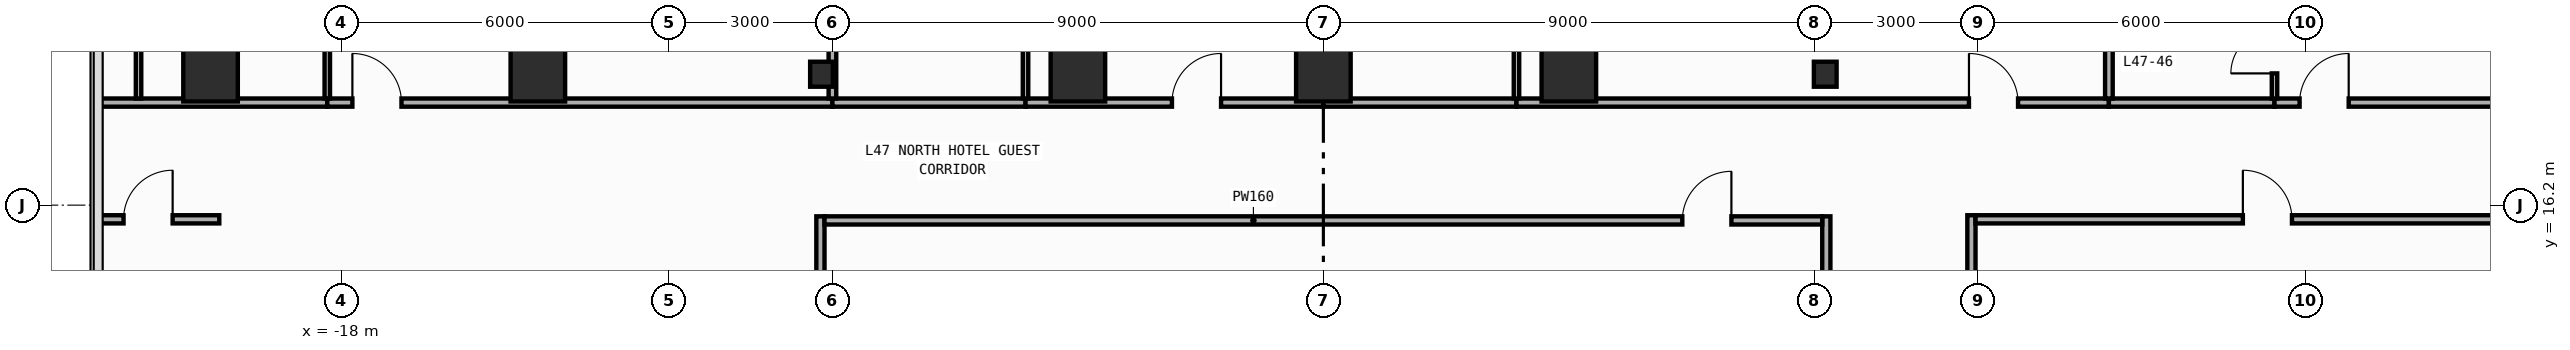
"""IFC4 building model, lengths in metres.
Left out: names, types, materials, properties, quantities, classifications, styles, units other than length and angle.
Written with IfcOpenShell. Run it as: python <this file> out.ifc"""

import sys

from ifc_helpers import new_model, si_unit, direction, frame, frame_2d, origin, origin_2d, place, context, subcontext, project, spatial, rectangle, i_section, extrude, element, fill, save


model = new_model("IFC4")
c1 = context("Model", 3, precision=1e-05, world=origin(), true_north=direction((0.0, 1.0)))
c2 = subcontext(c1, "Body", "Model", "MODEL_VIEW")
j1 = project(units=[si_unit("LENGTHUNIT", "METRE"), si_unit("PLANEANGLEUNIT", "RADIAN")], contexts=[c1])
p1 = place(None, origin())
s1 = spatial("IfcSite", under=j1, at=p1, CompositionType="ELEMENT")
p2 = place(p1, origin())
s2 = spatial("IfcBuilding", under=s1, at=p2, CompositionType="ELEMENT")
p3 = place(p2, frame((0.0, 0.0, 203.0)))
s3 = spatial("IfcBuildingStorey", under=s2, at=p3, CompositionType="ELEMENT", Elevation=203.0)
for number, where, z_axis, x_axis in (
    (1, (-9.2, 18.6, 0.0), (0.0, 0.0, 1.0), (1.0, 0.0, 0.0)),
    (2, (9.2, 18.6, 0.0), (0.0, 0.0, 1.0), (1.0, 0.0, 0.0)),
):
    element("IfcColumn", number, at=place(p3, frame(where, z_axis=z_axis, x_axis=x_axis)), inside=s3, PredefinedType="COLUMN", context=c2, shape_type="SweptSolid", body=[
        extrude(i_section(OverallWidth=0.417, OverallDepth=0.458, WebThickness=0.03, FlangeThickness=0.05, FilletRadius=0.022, at=origin_2d()), origin(), (0.0, 0.0, 1.0), 3.8),
    ])
for number, where, z_axis, x_axis in (
    (3, (-20.4, 18.6, 0.0), (0.0, 0.0, 1.0), (1.0, 0.0, 0.0)),
    (4, (-14.4, 18.6, 0.0), (0.0, 0.0, 1.0), (1.0, 0.0, 0.0)),
    (5, (-4.5, 18.6, 0.0), (0.0, 0.0, 1.0), (1.0, 0.0, 0.0)),
    (6, (0.0, 18.6, 0.0), (0.0, 0.0, 1.0), (1.0, 0.0, 0.0)),
    (7, (4.5, 18.6, 0.0), (0.0, 0.0, 1.0), (1.0, 0.0, 0.0)),
):
    element("IfcColumn", number, at=place(p3, frame(where, z_axis=z_axis, x_axis=x_axis)), inside=s3, PredefinedType="COLUMN", context=c2, shape_type="SweptSolid", body=[
        extrude(rectangle(XDim=1.0, YDim=1.0, at=origin_2d()), origin(), (0.0, 0.0, 1.0), 3.8),
    ])
p4 = place(p3, frame((-9.22, -1.8, 0.0), z_axis=(0.0, 0.0, 1.0), x_axis=(0.0, 1.0, 0.0)))
e8 = element("IfcWall", 8, at=p4, inside=s3, PredefinedType="PARTITIONING", context=c2, shape_type="SweptSolid", body=[
    extrude(rectangle(XDim=17.795, YDim=0.15, at=frame_2d((8.897, 0.0))), origin(), (0.0, 0.0, 1.0), 2.952),
])
p5 = place(p4, frame((6.729, 0.0, 0.0)))
e9 = element("IfcOpeningElement", 9, at=p5, cuts=e8, PredefinedType="OPENING", context=c2, shape_type="SweptSolid", body=[
    extrude(rectangle(XDim=0.9, YDim=2.15, at=frame_2d((0.45, 1.075))), frame((0.0, 0.085, 0.0), z_axis=(0.0, -1.0, 0.0), x_axis=(1.0, 0.0, 0.0)), (0.0, 0.0, 1.0), 0.17),
])
p6 = place(p3, frame((9.22, -1.8, 0.0), z_axis=(0.0, 0.0, 1.0), x_axis=(0.0, 1.0, 0.0)))
e10 = element("IfcWall", 10, at=p6, inside=s3, PredefinedType="PARTITIONING", context=c2, shape_type="SweptSolid", body=[
    extrude(rectangle(XDim=17.795, YDim=0.15, at=frame_2d((8.897, 0.0))), origin(), (0.0, 0.0, 1.0), 2.952),
])
p7 = place(p6, frame((6.729, 0.0, 0.0)))
e11 = element("IfcOpeningElement", 11, at=p7, cuts=e10, PredefinedType="OPENING", context=c2, shape_type="SweptSolid", body=[
    extrude(rectangle(XDim=0.9, YDim=2.15, at=frame_2d((0.45, 1.075))), frame((0.0, 0.085, 0.0), z_axis=(0.0, -1.0, 0.0), x_axis=(1.0, 0.0, 0.0)), (0.0, 0.0, 1.0), 0.17),
])
p8 = place(p3, frame((11.88, 7.16, 0.0), z_axis=(0.0, 0.0, 1.0), x_axis=(0.0, 1.0, 0.0)))
e12 = element("IfcWall", 12, at=p8, inside=s3, PredefinedType="PARTITIONING", context=c2, shape_type="SweptSolid", body=[
    extrude(rectangle(XDim=8.855, YDim=0.15, at=frame_2d((4.427, 0.0))), origin(), (0.0, 0.0, 1.0), 3.54),
])
p9 = place(p8, frame((0.46, 0.0, 0.0)))
e13 = element("IfcOpeningElement", 13, at=p9, cuts=e12, PredefinedType="OPENING", context=c2, shape_type="SweptSolid", body=[
    extrude(rectangle(XDim=0.9, YDim=2.15, at=frame_2d((0.45, 1.075))), frame((0.0, 0.085, 0.0), z_axis=(0.0, -1.0, 0.0), x_axis=(1.0, 0.0, 0.0)), (0.0, 0.0, 1.0), 0.17),
])
p10 = place(p3, frame((-9.145, 15.92, 0.0), z_axis=(0.0, 0.0, 1.0), x_axis=(1.0, 0.0, 0.0)))
e14 = element("IfcWall", 14, at=p10, inside=s3, PredefinedType="PARTITIONING", context=c2, shape_type="SweptSolid", body=[
    extrude(rectangle(XDim=18.29, YDim=0.15, at=frame_2d((9.145, 0.0))), origin(), (0.0, 0.0, 1.0), 3.54),
])
p11 = place(p10, frame((15.725, 0.0, 0.0)))
e15 = element("IfcOpeningElement", 15, at=p11, cuts=e14, PredefinedType="OPENING", context=c2, shape_type="SweptSolid", body=[
    extrude(rectangle(XDim=0.9, YDim=2.15, at=frame_2d((0.45, 1.075))), frame((0.0, 0.085, 0.0), z_axis=(0.0, -1.0, 0.0), x_axis=(1.0, 0.0, 0.0)), (0.0, 0.0, 1.0), 0.17),
])
p12 = place(p3, frame((-22.455, 18.08, 0.0), z_axis=(0.0, 0.0, 1.0), x_axis=(1.0, 0.0, 0.0)))
e16 = element("IfcWall", 16, at=p12, inside=s3, PredefinedType="PARTITIONING", context=c2, shape_type="SweptSolid", body=[
    extrude(rectangle(XDim=4.195, YDim=0.15, at=frame_2d((2.098, 0.0))), origin(), (0.0, 0.0, 1.0), 3.54),
])
p13 = place(p3, frame((-18.26, 18.08, 0.0), z_axis=(0.0, 0.0, 1.0), x_axis=(1.0, 0.0, 0.0)))
e17 = element("IfcWall", 17, at=p13, inside=s3, PredefinedType="PARTITIONING", context=c2, shape_type="SweptSolid", body=[
    extrude(rectangle(XDim=9.26, YDim=0.15, at=frame_2d((4.63, 0.0))), origin(), (0.0, 0.0, 1.0), 3.54),
])
p14 = place(p13, frame((0.46, 0.0, 0.0)))
e18 = element("IfcOpeningElement", 18, at=p14, cuts=e17, PredefinedType="OPENING", context=c2, shape_type="SweptSolid", body=[
    extrude(rectangle(XDim=0.9, YDim=2.15, at=frame_2d((0.45, 1.075))), frame((0.0, 0.085, 0.0), z_axis=(0.0, -1.0, 0.0), x_axis=(1.0, 0.0, 0.0)), (0.0, 0.0, 1.0), 0.17),
])
p15 = place(p3, frame((-9.0, 18.08, 0.0), z_axis=(0.0, 0.0, 1.0), x_axis=(1.0, 0.0, 0.0)))
e19 = element("IfcWall", 19, at=p15, inside=s3, PredefinedType="PARTITIONING", context=c2, shape_type="SweptSolid", body=[
    extrude(rectangle(XDim=3.54, YDim=0.15, at=frame_2d((1.77, 0.0))), origin(), (0.0, 0.0, 1.0), 3.54),
])
p16 = place(p3, frame((-5.46, 18.08, 0.0), z_axis=(0.0, 0.0, 1.0), x_axis=(1.0, 0.0, 0.0)))
e20 = element("IfcWall", 20, at=p16, inside=s3, PredefinedType="PARTITIONING", context=c2, shape_type="SweptSolid", body=[
    extrude(rectangle(XDim=5.46, YDim=0.15, at=frame_2d((2.73, 0.0))), origin(), (0.0, 0.0, 1.0), 3.54),
])
p17 = place(p16, frame((2.684, 0.0, 0.0)))
e21 = element("IfcOpeningElement", 21, at=p17, cuts=e20, PredefinedType="OPENING", context=c2, shape_type="SweptSolid", body=[
    extrude(rectangle(XDim=0.9, YDim=2.15, at=frame_2d((0.45, 1.075))), frame((0.0, 0.085, 0.0), z_axis=(0.0, -1.0, 0.0), x_axis=(1.0, 0.0, 0.0)), (0.0, 0.0, 1.0), 0.17),
])
p18 = place(p3, frame((0.0, 18.08, 0.0), z_axis=(0.0, 0.0, 1.0), x_axis=(1.0, 0.0, 0.0)))
e22 = element("IfcWall", 22, at=p18, inside=s3, PredefinedType="PARTITIONING", context=c2, shape_type="SweptSolid", body=[
    extrude(rectangle(XDim=3.54, YDim=0.15, at=frame_2d((1.77, 0.0))), origin(), (0.0, 0.0, 1.0), 3.54),
])
p19 = place(p3, frame((3.54, 18.08, 0.0), z_axis=(0.0, 0.0, 1.0), x_axis=(1.0, 0.0, 0.0)))
e23 = element("IfcWall", 23, at=p19, inside=s3, PredefinedType="PARTITIONING", context=c2, shape_type="SweptSolid", body=[
    extrude(rectangle(XDim=10.86, YDim=0.15, at=frame_2d((5.43, 0.0))), origin(), (0.0, 0.0, 1.0), 3.54),
])
p20 = place(p19, frame((8.295, 0.0, 0.0)))
e24 = element("IfcOpeningElement", 24, at=p20, cuts=e23, PredefinedType="OPENING", context=c2, shape_type="SweptSolid", body=[
    extrude(rectangle(XDim=0.9, YDim=2.15, at=frame_2d((0.45, 1.075))), frame((0.0, 0.085, 0.0), z_axis=(0.0, -1.0, 0.0), x_axis=(1.0, 0.0, 0.0)), (0.0, 0.0, 1.0), 0.17),
])
p21 = place(p3, frame((14.4, 18.08, 0.0), z_axis=(0.0, 0.0, 1.0), x_axis=(1.0, 0.0, 0.0)))
e25 = element("IfcWall", 25, at=p21, inside=s3, PredefinedType="PARTITIONING", context=c2, shape_type="SweptSolid", body=[
    extrude(rectangle(XDim=3.036, YDim=0.15, at=frame_2d((1.518, 0.0))), origin(), (0.0, 0.0, 1.0), 3.54),
])
p22 = place(p3, frame((17.436, 18.08, 0.0), z_axis=(0.0, 0.0, 1.0), x_axis=(1.0, 0.0, 0.0)))
e26 = element("IfcWall", 26, at=p22, inside=s3, PredefinedType="PARTITIONING", context=c2, shape_type="SweptSolid", body=[
    extrude(rectangle(XDim=5.019, YDim=0.15, at=frame_2d((2.51, 0.0))), origin(), (0.0, 0.0, 1.0), 3.54),
])
p23 = place(p22, frame((0.46, 0.0, 0.0)))
e27 = element("IfcOpeningElement", 27, at=p23, cuts=e26, PredefinedType="OPENING", context=c2, shape_type="SweptSolid", body=[
    extrude(rectangle(XDim=0.9, YDim=2.15, at=frame_2d((0.45, 1.075))), frame((0.0, 0.085, 0.0), z_axis=(0.0, -1.0, 0.0), x_axis=(1.0, 0.0, 0.0)), (0.0, 0.0, 1.0), 0.17),
])
p24 = place(p3, frame((11.955, 15.94, 0.0), z_axis=(0.0, 0.0, 1.0), x_axis=(1.0, 0.0, 0.0)))
e28 = element("IfcWall", 28, at=p24, inside=s3, PredefinedType="PARTITIONING", context=c2, shape_type="SweptSolid", body=[
    extrude(rectangle(XDim=10.5, YDim=0.15, at=frame_2d((5.25, 0.0))), origin(), (0.0, 0.0, 1.0), 3.54),
])
p25 = place(p24, frame((4.901, 0.0, 0.0)))
e29 = element("IfcOpeningElement", 29, at=p25, cuts=e28, PredefinedType="OPENING", context=c2, shape_type="SweptSolid", body=[
    extrude(rectangle(XDim=0.9, YDim=2.15, at=frame_2d((0.45, 1.075))), frame((0.0, 0.085, 0.0), z_axis=(0.0, -1.0, 0.0), x_axis=(1.0, 0.0, 0.0)), (0.0, 0.0, 1.0), 0.17),
])
p26 = place(p3, frame((-22.455, 15.94, 0.0), z_axis=(0.0, 0.0, 1.0), x_axis=(1.0, 0.0, 0.0)))
e30 = element("IfcWall", 30, at=p26, inside=s3, PredefinedType="PARTITIONING", context=c2, shape_type="SweptSolid", body=[
    extrude(rectangle(XDim=2.215, YDim=0.15, at=frame_2d((1.107, 0.0))), origin(), (0.0, 0.0, 1.0), 3.54),
])
p27 = place(p26, frame((0.46, 0.0, 0.0)))
e31 = element("IfcOpeningElement", 31, at=p27, cuts=e30, PredefinedType="OPENING", context=c2, shape_type="SweptSolid", body=[
    extrude(rectangle(XDim=0.9, YDim=2.15, at=frame_2d((0.45, 1.075))), frame((0.0, 0.085, 0.0), z_axis=(0.0, -1.0, 0.0), x_axis=(1.0, 0.0, 0.0)), (0.0, 0.0, 1.0), 0.17),
])
p28 = place(p3, frame((-18.26, 18.155, 0.0), z_axis=(0.0, 0.0, 1.0), x_axis=(0.0, 1.0, 0.0)))
e32 = element("IfcWall", 32, at=p28, inside=s3, PredefinedType="PARTITIONING", context=c2, shape_type="SweptSolid", body=[
    extrude(rectangle(XDim=2.965, YDim=0.1, at=frame_2d((1.482, 0.0))), origin(), (0.0, 0.0, 1.0), 3.54),
])
p29 = place(p28, frame((1.705, 0.0, 0.0)))
e33 = element("IfcOpeningElement", 33, at=p29, cuts=e32, PredefinedType="OPENING", context=c2, shape_type="SweptSolid", body=[
    extrude(rectangle(XDim=0.8, YDim=2.1, at=frame_2d((0.4, 1.05))), frame((0.0, 0.06, 0.0), z_axis=(0.0, -1.0, 0.0), x_axis=(1.0, 0.0, 0.0)), (0.0, 0.0, 1.0), 0.12),
])
p30 = place(p3, frame((-9.0, 18.155, 0.0), z_axis=(0.0, 0.0, 1.0), x_axis=(0.0, 1.0, 0.0)))
e34 = element("IfcWall", 34, at=p30, inside=s3, PredefinedType="PARTITIONING", context=c2, shape_type="SweptSolid", body=[
    extrude(rectangle(XDim=3.015, YDim=0.14, at=frame_2d((1.507, 0.0))), origin(), (0.0, 0.0, 1.0), 2.952),
])
p31 = place(p3, frame((-5.46, 18.155, 0.0), z_axis=(0.0, 0.0, 1.0), x_axis=(0.0, 1.0, 0.0)))
e35 = element("IfcWall", 35, at=p31, inside=s3, PredefinedType="PARTITIONING", context=c2, shape_type="SweptSolid", body=[
    extrude(rectangle(XDim=2.965, YDim=0.1, at=frame_2d((1.482, 0.0))), origin(), (0.0, 0.0, 1.0), 3.54),
])
p32 = place(p31, frame((1.705, 0.0, 0.0)))
e36 = element("IfcOpeningElement", 36, at=p32, cuts=e35, PredefinedType="OPENING", context=c2, shape_type="SweptSolid", body=[
    extrude(rectangle(XDim=0.8, YDim=2.1, at=frame_2d((0.4, 1.05))), frame((0.0, 0.06, 0.0), z_axis=(0.0, -1.0, 0.0), x_axis=(1.0, 0.0, 0.0)), (0.0, 0.0, 1.0), 0.12),
])
p33 = place(p3, frame((0.0, 18.155, 0.0), z_axis=(0.0, 0.0, 1.0), x_axis=(0.0, 1.0, 0.0)))
e37 = element("IfcWall", 37, at=p33, inside=s3, PredefinedType="PARTITIONING", context=c2, shape_type="SweptSolid", body=[
    extrude(rectangle(XDim=3.015, YDim=0.14, at=frame_2d((1.507, 0.0))), origin(), (0.0, 0.0, 1.0), 3.54),
])
p34 = place(p3, frame((3.54, 18.155, 0.0), z_axis=(0.0, 0.0, 1.0), x_axis=(0.0, 1.0, 0.0)))
e38 = element("IfcWall", 38, at=p34, inside=s3, PredefinedType="PARTITIONING", context=c2, shape_type="SweptSolid", body=[
    extrude(rectangle(XDim=2.965, YDim=0.1, at=frame_2d((1.482, 0.0))), origin(), (0.0, 0.0, 1.0), 3.54),
])
p35 = place(p34, frame((1.705, 0.0, 0.0)))
e39 = element("IfcOpeningElement", 39, at=p35, cuts=e38, PredefinedType="OPENING", context=c2, shape_type="SweptSolid", body=[
    extrude(rectangle(XDim=0.8, YDim=2.1, at=frame_2d((0.4, 1.05))), frame((0.0, 0.06, 0.0), z_axis=(0.0, -1.0, 0.0), x_axis=(1.0, 0.0, 0.0)), (0.0, 0.0, 1.0), 0.12),
])
p36 = place(p3, frame((14.4, 18.155, 0.0), z_axis=(0.0, 0.0, 1.0), x_axis=(0.0, 1.0, 0.0)))
e40 = element("IfcWall", 40, at=p36, inside=s3, PredefinedType="PARTITIONING", context=c2, shape_type="SweptSolid", body=[
    extrude(rectangle(XDim=3.015, YDim=0.14, at=frame_2d((1.507, 0.0))), origin(), (0.0, 0.0, 1.0), 2.952),
])
p37 = place(p3, frame((17.436, 18.155, 0.0), z_axis=(0.0, 0.0, 1.0), x_axis=(0.0, 1.0, 0.0)))
e41 = element("IfcWall", 41, at=p37, inside=s3, PredefinedType="PARTITIONING", context=c2, shape_type="SweptSolid", body=[
    extrude(rectangle(XDim=2.965, YDim=0.1, at=frame_2d((1.482, 0.0))), origin(), (0.0, 0.0, 1.0), 3.54),
])
p38 = place(p37, frame((0.46, 0.0, 0.0)))
e42 = element("IfcOpeningElement", 42, at=p38, cuts=e41, PredefinedType="OPENING", context=c2, shape_type="SweptSolid", body=[
    extrude(rectangle(XDim=0.8, YDim=2.1, at=frame_2d((0.4, 1.05))), frame((0.0, 0.06, 0.0), z_axis=(0.0, -1.0, 0.0), x_axis=(1.0, 0.0, 0.0)), (0.0, 0.0, 1.0), 0.12),
])
p39 = place(p3, frame((-21.72, 18.155, 0.0), z_axis=(0.0, 0.0, 1.0), x_axis=(0.0, 1.0, 0.0)))
e43 = element("IfcWall", 43, at=p39, inside=s3, PredefinedType="PARTITIONING", context=c2, shape_type="SweptSolid", body=[
    extrude(rectangle(XDim=2.965, YDim=0.1, at=frame_2d((1.482, 0.0))), origin(), (0.0, 0.0, 1.0), 3.54),
])
p40 = place(p11, origin())
e44 = element("IfcDoor", 44, at=p40, inside=s3, OperationType="SINGLE_SWING_RIGHT", PredefinedType="DOOR", context=c2, shape_type="SweptSolid", body=[
    extrude(rectangle(XDim=0.9, YDim=2.15, at=frame_2d((0.45, 1.075))), frame((0.0, 0.025, 0.0), z_axis=(0.0, -1.0, 0.0), x_axis=(1.0, 0.0, 0.0)), (0.0, 0.0, 1.0), 0.05),
])
fill(e15, e44)
p41 = place(p14, origin())
e45 = element("IfcDoor", 45, at=p41, inside=s3, OperationType="SINGLE_SWING_LEFT", PredefinedType="DOOR", context=c2, shape_type="SweptSolid", body=[
    extrude(rectangle(XDim=0.9, YDim=2.15, at=frame_2d((0.45, 1.075))), frame((0.0, 0.025, 0.0), z_axis=(0.0, -1.0, 0.0), x_axis=(1.0, 0.0, 0.0)), (0.0, 0.0, 1.0), 0.05),
])
fill(e18, e45)
p42 = place(p17, origin())
e46 = element("IfcDoor", 46, at=p42, inside=s3, OperationType="SINGLE_SWING_RIGHT", PredefinedType="DOOR", context=c2, shape_type="SweptSolid", body=[
    extrude(rectangle(XDim=0.9, YDim=2.15, at=frame_2d((0.45, 1.075))), frame((0.0, 0.025, 0.0), z_axis=(0.0, -1.0, 0.0), x_axis=(1.0, 0.0, 0.0)), (0.0, 0.0, 1.0), 0.05),
])
fill(e21, e46)
p43 = place(p20, origin())
e47 = element("IfcDoor", 47, at=p43, inside=s3, OperationType="SINGLE_SWING_LEFT", PredefinedType="DOOR", context=c2, shape_type="SweptSolid", body=[
    extrude(rectangle(XDim=0.9, YDim=2.15, at=frame_2d((0.45, 1.075))), frame((0.0, 0.025, 0.0), z_axis=(0.0, -1.0, 0.0), x_axis=(1.0, 0.0, 0.0)), (0.0, 0.0, 1.0), 0.05),
])
fill(e24, e47)
p44 = place(p23, origin())
e48 = element("IfcDoor", 48, at=p44, inside=s3, OperationType="SINGLE_SWING_RIGHT", PredefinedType="DOOR", context=c2, shape_type="SweptSolid", body=[
    extrude(rectangle(XDim=0.9, YDim=2.15, at=frame_2d((0.45, 1.075))), frame((0.0, 0.025, 0.0), z_axis=(0.0, -1.0, 0.0), x_axis=(1.0, 0.0, 0.0)), (0.0, 0.0, 1.0), 0.05),
])
fill(e27, e48)
p45 = place(p25, origin())
e49 = element("IfcDoor", 49, at=p45, inside=s3, OperationType="SINGLE_SWING_LEFT", PredefinedType="DOOR", context=c2, shape_type="SweptSolid", body=[
    extrude(rectangle(XDim=0.9, YDim=2.15, at=frame_2d((0.45, 1.075))), frame((0.0, 0.025, 0.0), z_axis=(0.0, -1.0, 0.0), x_axis=(1.0, 0.0, 0.0)), (0.0, 0.0, 1.0), 0.05),
])
fill(e29, e49)
p46 = place(p27, origin())
e50 = element("IfcDoor", 50, at=p46, inside=s3, OperationType="SINGLE_SWING_RIGHT", PredefinedType="DOOR", context=c2, shape_type="SweptSolid", body=[
    extrude(rectangle(XDim=0.9, YDim=2.15, at=frame_2d((0.45, 1.075))), frame((0.0, 0.025, 0.0), z_axis=(0.0, -1.0, 0.0), x_axis=(1.0, 0.0, 0.0)), (0.0, 0.0, 1.0), 0.05),
])
fill(e31, e50)
p47 = place(p38, origin())
e51 = element("IfcDoor", 51, at=p47, inside=s3, OperationType="SINGLE_SWING_LEFT", PredefinedType="DOOR", context=c2, shape_type="SweptSolid", body=[
    extrude(rectangle(XDim=0.8, YDim=2.1, at=frame_2d((0.4, 1.05))), frame((0.0, 0.025, 0.0), z_axis=(0.0, -1.0, 0.0), x_axis=(1.0, 0.0, 0.0)), (0.0, 0.0, 1.0), 0.05),
])
fill(e42, e51)
save(model, sys.argv[1])
